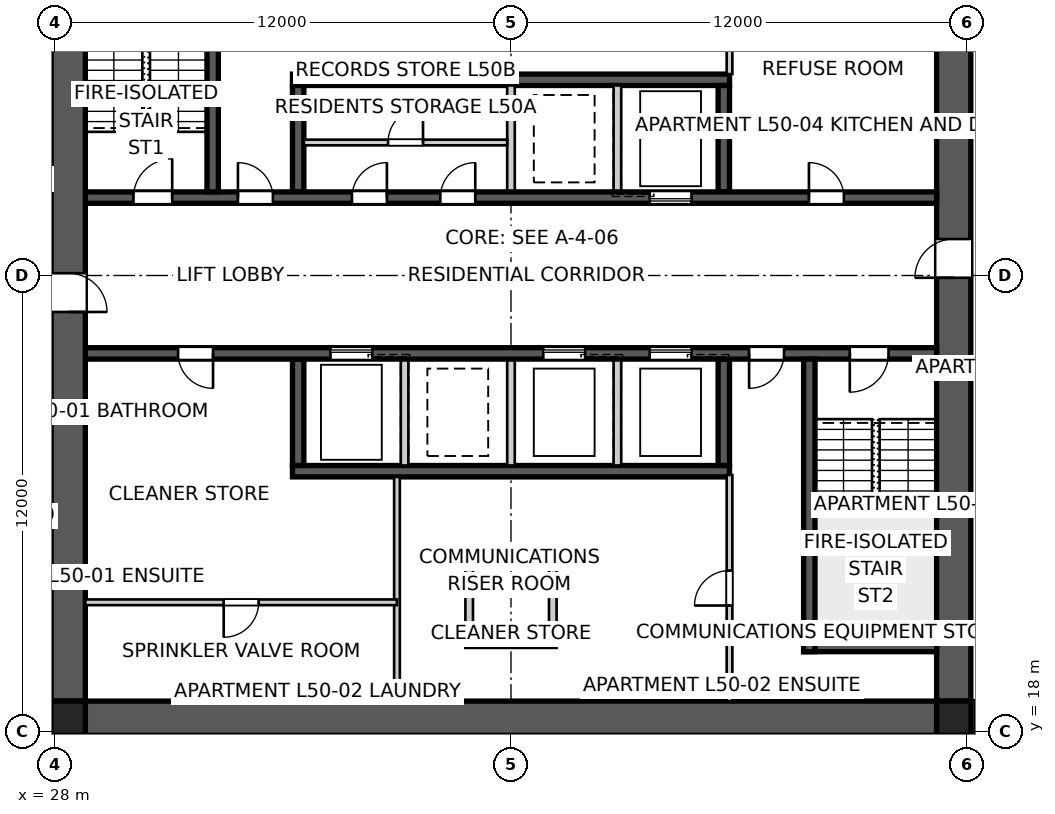
"""IFC4 building model, lengths in metres.
Left out: names, types, materials, properties, quantities, classifications, styles, units other than length and angle.
Written with IfcOpenShell. Run it as: python <this file> out.ifc"""

import sys

from ifc_helpers import new_model, si_unit, direction, frame, frame_2d, origin, origin_2d, place, context, subcontext, project, spatial, polyline, rectangle, outline, extrude, element, fill, save


model = new_model("IFC4")
c1 = context("Model", 3, precision=1e-05, world=origin(), true_north=direction((0.0, 1.0)))
c2 = subcontext(c1, "Body", "Model", "MODEL_VIEW")
j1 = project(units=[si_unit("LENGTHUNIT", "METRE"), si_unit("PLANEANGLEUNIT", "RADIAN")], contexts=[c1])
p1 = place(None, origin())
s1 = spatial("IfcSite", under=j1, at=p1, CompositionType="ELEMENT")
p2 = place(p1, origin())
s2 = spatial("IfcBuilding", under=s1, at=p2, CompositionType="ELEMENT")
p3 = place(p2, frame((0.0, 0.0, 182.8)))
s3 = spatial("IfcBuildingStorey", under=s2, at=p3, CompositionType="ELEMENT", Elevation=182.8)
p4 = place(p3, frame((51.2, 18.35, 0.0), z_axis=(0.0, 0.0, 1.0), x_axis=(-1.0, 0.0, 0.0)))
e1 = element("IfcWall", 1, at=p4, inside=s3, PredefinedType="SHEAR", context=c2, shape_type="SweptSolid", body=[
    extrude(outline(polyline([(0.0, -0.45), (22.4, -0.45), (22.4, -0.025), (22.85, -0.025), (22.85, 0.025), (22.4, 0.025), (22.4, 0.45), (0.0, 0.45), (0.0, 0.025), (-0.45, 0.025), (-0.45, -0.025), (0.0, -0.025), (0.0, -0.45)])), origin(), (0.0, 0.0, 1.0), 3.4),
])
p5 = place(p3, frame((51.65, 18.8, 0.0), z_axis=(0.0, 0.0, 1.0), x_axis=(0.0, 1.0, 0.0)))
e2 = element("IfcWall", 2, at=p5, inside=s3, PredefinedType="SHEAR", context=c2, shape_type="SweptSolid", body=[
    extrude(outline(polyline([(0.0, -0.45), (22.4, -0.45), (22.4, -0.025), (22.85, -0.025), (22.85, 0.025), (22.4, 0.025), (22.4, 0.45), (0.0, 0.45), (0.0, 0.025), (-0.45, 0.025), (-0.45, -0.025), (0.0, -0.025), (0.0, -0.45)])), origin(), (0.0, 0.0, 1.0), 3.4),
])
p6 = place(p5, frame((11.14, 0.0, 0.0)))
e3 = element("IfcOpeningElement", 3, at=p6, cuts=e2, PredefinedType="OPENING", context=c2, shape_type="SweptSolid", body=[
    extrude(rectangle(XDim=1.02, YDim=2.4, at=frame_2d((0.51, 1.2))), frame((0.0, 0.46, 0.0), z_axis=(0.0, -1.0, 0.0), x_axis=(1.0, 0.0, 0.0)), (0.0, 0.0, 1.0), 0.92),
])
p7 = place(p3, frame((28.35, 41.2, 0.0), z_axis=(0.0, 0.0, 1.0), x_axis=(0.0, -1.0, 0.0)))
e4 = element("IfcWall", 4, at=p7, inside=s3, PredefinedType="SHEAR", context=c2, shape_type="SweptSolid", body=[
    extrude(outline(polyline([(0.0, -0.45), (22.4, -0.45), (22.4, -0.025), (22.85, -0.025), (22.85, 0.025), (22.4, 0.025), (22.4, 0.45), (0.0, 0.45), (0.0, 0.025), (-0.45, 0.025), (-0.45, -0.025), (0.0, -0.025), (0.0, -0.45)])), origin(), (0.0, 0.0, 1.0), 3.4),
])
p8 = place(p7, frame((11.14, 0.0, 0.0)))
e5 = element("IfcOpeningElement", 5, at=p8, cuts=e4, PredefinedType="OPENING", context=c2, shape_type="SweptSolid", body=[
    extrude(rectangle(XDim=1.02, YDim=2.4, at=frame_2d((0.51, 1.2))), frame((0.0, 0.46, 0.0), z_axis=(0.0, -1.0, 0.0), x_axis=(1.0, 0.0, 0.0)), (0.0, 0.0, 1.0), 0.92),
])
p9 = place(p3, frame((28.8, 32.05, 0.0), z_axis=(0.0, 0.0, 1.0), x_axis=(1.0, 0.0, 0.0)))
e6 = element("IfcWall", 6, at=p9, inside=s3, PredefinedType="SHEAR", context=c2, shape_type="SweptSolid", body=[
    extrude(rectangle(XDim=22.4, YDim=0.3, at=frame_2d((11.2, 0.0))), origin(), (0.0, 0.0, 1.0), 3.4),
])
p10 = place(p9, frame((19.04, 0.0, 0.0)))
e7 = element("IfcOpeningElement", 7, at=p10, cuts=e6, PredefinedType="OPENING", context=c2, shape_type="SweptSolid", body=[
    extrude(rectangle(XDim=0.92, YDim=2.1, at=frame_2d((0.46, 1.05))), frame((0.0, 0.16, 0.0), z_axis=(0.0, -1.0, 0.0), x_axis=(1.0, 0.0, 0.0)), (0.0, 0.0, 1.0), 0.32),
])
p11 = place(p9, frame((1.265, 0.0, 0.0)))
e8 = element("IfcOpeningElement", 8, at=p11, cuts=e6, PredefinedType="OPENING", context=c2, shape_type="SweptSolid", body=[
    extrude(rectangle(XDim=1.02, YDim=2.1, at=frame_2d((0.51, 1.05))), frame((0.0, 0.16, 0.0), z_axis=(0.0, -1.0, 0.0), x_axis=(1.0, 0.0, 0.0)), (0.0, 0.0, 1.0), 0.32),
])
p12 = place(p9, frame((4.015, 0.0, 0.0)))
e9 = element("IfcOpeningElement", 9, at=p12, cuts=e6, PredefinedType="OPENING", context=c2, shape_type="SweptSolid", body=[
    extrude(rectangle(XDim=0.92, YDim=2.1, at=frame_2d((0.46, 1.05))), frame((0.0, 0.16, 0.0), z_axis=(0.0, -1.0, 0.0), x_axis=(1.0, 0.0, 0.0)), (0.0, 0.0, 1.0), 0.32),
])
p13 = place(p9, frame((7.015, 0.0, 0.0)))
e10 = element("IfcOpeningElement", 10, at=p13, cuts=e6, PredefinedType="OPENING", context=c2, shape_type="SweptSolid", body=[
    extrude(rectangle(XDim=0.92, YDim=2.1, at=frame_2d((0.46, 1.05))), frame((0.0, 0.16, 0.0), z_axis=(0.0, -1.0, 0.0), x_axis=(1.0, 0.0, 0.0)), (0.0, 0.0, 1.0), 0.32),
])
p14 = place(p9, frame((9.34, 0.0, 0.0)))
e11 = element("IfcOpeningElement", 11, at=p14, cuts=e6, PredefinedType="OPENING", context=c2, shape_type="SweptSolid", body=[
    extrude(rectangle(XDim=0.92, YDim=2.1, at=frame_2d((0.46, 1.05))), frame((0.0, 0.16, 0.0), z_axis=(0.0, -1.0, 0.0), x_axis=(1.0, 0.0, 0.0)), (0.0, 0.0, 1.0), 0.32),
])
p15 = place(p9, frame((14.85, 0.0, 0.0)))
e12 = element("IfcOpeningElement", 12, at=p15, cuts=e6, PredefinedType="OPENING", context=c2, shape_type="SweptSolid", body=[
    extrude(rectangle(XDim=1.1, YDim=2.1, at=frame_2d((0.55, 1.05))), frame((0.0, 0.16, 0.0), z_axis=(0.0, -1.0, 0.0), x_axis=(1.0, 0.0, 0.0)), (0.0, 0.0, 1.0), 0.32),
])
p16 = place(p3, frame((51.2, 27.95, 0.0), z_axis=(0.0, 0.0, 1.0), x_axis=(-1.0, 0.0, 0.0)))
e13 = element("IfcWall", 13, at=p16, inside=s3, PredefinedType="SHEAR", context=c2, shape_type="SweptSolid", body=[
    extrude(rectangle(XDim=22.4, YDim=0.3, at=frame_2d((11.2, 0.0))), origin(), (0.0, 0.0, 1.0), 3.4),
])
p17 = place(p16, frame((19.04, 0.0, 0.0)))
e14 = element("IfcOpeningElement", 14, at=p17, cuts=e13, PredefinedType="OPENING", context=c2, shape_type="SweptSolid", body=[
    extrude(rectangle(XDim=0.92, YDim=2.1, at=frame_2d((0.46, 1.05))), frame((0.0, 0.16, 0.0), z_axis=(0.0, -1.0, 0.0), x_axis=(1.0, 0.0, 0.0)), (0.0, 0.0, 1.0), 0.32),
])
p18 = place(p16, frame((1.265, 0.0, 0.0)))
e15 = element("IfcOpeningElement", 15, at=p18, cuts=e13, PredefinedType="OPENING", context=c2, shape_type="SweptSolid", body=[
    extrude(rectangle(XDim=1.02, YDim=2.1, at=frame_2d((0.51, 1.05))), frame((0.0, 0.16, 0.0), z_axis=(0.0, -1.0, 0.0), x_axis=(1.0, 0.0, 0.0)), (0.0, 0.0, 1.0), 0.32),
])
p19 = place(p16, frame((4.015, 0.0, 0.0)))
e16 = element("IfcOpeningElement", 16, at=p19, cuts=e13, PredefinedType="OPENING", context=c2, shape_type="SweptSolid", body=[
    extrude(rectangle(XDim=0.92, YDim=2.1, at=frame_2d((0.46, 1.05))), frame((0.0, 0.16, 0.0), z_axis=(0.0, -1.0, 0.0), x_axis=(1.0, 0.0, 0.0)), (0.0, 0.0, 1.0), 0.32),
])
p20 = place(p16, frame((6.45, 0.0, 0.0)))
e17 = element("IfcOpeningElement", 17, at=p20, cuts=e13, PredefinedType="OPENING", context=c2, shape_type="SweptSolid", body=[
    extrude(rectangle(XDim=1.1, YDim=2.1, at=frame_2d((0.55, 1.05))), frame((0.0, 0.16, 0.0), z_axis=(0.0, -1.0, 0.0), x_axis=(1.0, 0.0, 0.0)), (0.0, 0.0, 1.0), 0.32),
])
p21 = place(p16, frame((9.25, 0.0, 0.0)))
e18 = element("IfcOpeningElement", 18, at=p21, cuts=e13, PredefinedType="OPENING", context=c2, shape_type="SweptSolid", body=[
    extrude(rectangle(XDim=1.1, YDim=2.1, at=frame_2d((0.55, 1.05))), frame((0.0, 0.16, 0.0), z_axis=(0.0, -1.0, 0.0), x_axis=(1.0, 0.0, 0.0)), (0.0, 0.0, 1.0), 0.32),
])
p22 = place(p16, frame((14.85, 0.0, 0.0)))
e19 = element("IfcOpeningElement", 19, at=p22, cuts=e13, PredefinedType="OPENING", context=c2, shape_type="SweptSolid", body=[
    extrude(rectangle(XDim=1.1, YDim=2.1, at=frame_2d((0.55, 1.05))), frame((0.0, 0.16, 0.0), z_axis=(0.0, -1.0, 0.0), x_axis=(1.0, 0.0, 0.0)), (0.0, 0.0, 1.0), 0.32),
])
for number, where, z_axis, x_axis in (
    (20, (34.25, 35.15, 0.0), (0.0, 0.0, 1.0), (1.0, 0.0, 0.0)),
    (21, (45.75, 24.85, 0.0), (0.0, 0.0, 1.0), (-1.0, 0.0, 0.0)),
):
    element("IfcWall", number, at=place(p3, frame(where, z_axis=z_axis, x_axis=x_axis)), inside=s3, PredefinedType="SHEAR", context=c2, shape_type="SweptSolid", body=[
        extrude(rectangle(XDim=11.5, YDim=0.3, at=frame_2d((5.75, 0.0))), origin(), (0.0, 0.0, 1.0), 3.4),
    ])
for number, where, z_axis, x_axis in (
    (22, (34.4, 32.2, 0.0), (0.0, 0.0, 1.0), (0.0, 1.0, 0.0)),
    (23, (45.6, 27.8, 0.0), (0.0, 0.0, 1.0), (0.0, -1.0, 0.0)),
):
    element("IfcWall", number, at=place(p3, frame(where, z_axis=z_axis, x_axis=x_axis)), inside=s3, PredefinedType="SHEAR", context=c2, shape_type="SweptSolid", body=[
        extrude(rectangle(XDim=2.8, YDim=0.3, at=frame_2d((1.4, 0.0))), origin(), (0.0, 0.0, 1.0), 3.4),
    ])
for number, where, z_axis, x_axis in (
    (24, (42.8, 27.8, 0.0), (0.0, 0.0, 1.0), (0.0, -1.0, 0.0)),
    (25, (40.0, 32.2, 0.0), (0.0, 0.0, 1.0), (0.0, 1.0, 0.0)),
    (26, (40.0, 27.8, 0.0), (0.0, 0.0, 1.0), (0.0, -1.0, 0.0)),
    (27, (42.8, 32.2, 0.0), (0.0, 0.0, 1.0), (0.0, 1.0, 0.0)),
    (28, (37.2, 27.8, 0.0), (0.0, 0.0, 1.0), (0.0, -1.0, 0.0)),
):
    element("IfcWall", number, at=place(p3, frame(where, z_axis=z_axis, x_axis=x_axis)), inside=s3, PredefinedType="SOLIDWALL", context=c2, shape_type="SweptSolid", body=[
        extrude(rectangle(XDim=2.8, YDim=0.2, at=frame_2d((1.4, 0.0))), origin(), (0.0, 0.0, 1.0), 3.4),
    ])
for number, where, z_axis, x_axis in (
    (29, (45.6, 32.2, 0.0), (0.0, 0.0, 1.0), (0.0, 1.0, 0.0)),
    (30, (34.4, 27.8, 0.0), (0.0, 0.0, 1.0), (0.0, -1.0, 0.0)),
):
    element("IfcWall", number, at=place(p3, frame(where, z_axis=z_axis, x_axis=x_axis)), inside=s3, PredefinedType="SHEAR", context=c2, shape_type="SweptSolid", body=[
        extrude(rectangle(XDim=2.8, YDim=0.3, at=frame_2d((1.4, 0.0))), origin(), (0.0, 0.0, 1.0), 3.4),
    ])
for number, where, z_axis, x_axis in (
    (31, (32.15, 32.2, 0.0), (0.0, 0.0, 1.0), (0.0, 1.0, 0.0)),
    (32, (47.85, 27.8, 0.0), (0.0, 0.0, 1.0), (0.0, -1.0, 0.0)),
):
    element("IfcWall", number, at=place(p3, frame(where, z_axis=z_axis, x_axis=x_axis)), inside=s3, PredefinedType="SHEAR", context=c2, shape_type="SweptSolid", body=[
        extrude(rectangle(XDim=7.7, YDim=0.3, at=frame_2d((3.85, 0.0))), origin(), (0.0, 0.0, 1.0), 3.4),
    ])
p23 = place(p3, frame((51.2, 20.25, 0.0), z_axis=(0.0, 0.0, 1.0), x_axis=(-1.0, 0.0, 0.0)))
e33 = element("IfcWall", 33, at=p23, inside=s3, PredefinedType="SHEAR", context=c2, shape_type="SweptSolid", body=[
    extrude(rectangle(XDim=3.5, YDim=0.3, at=frame_2d((1.75, 0.0))), origin(), (0.0, 0.0, 1.0), 3.4),
])
for number, where, z_axis, x_axis in (
    (34, (38.9, 22.4, 0.0), (0.0, 0.0, 1.0), (0.0, -1.0, 0.0)),
    (35, (41.1, 22.4, 0.0), (0.0, 0.0, 1.0), (0.0, -1.0, 0.0)),
):
    element("IfcWall", number, at=place(p3, frame(where, z_axis=z_axis, x_axis=x_axis)), inside=s3, PredefinedType="SOLIDWALL", context=c2, shape_type="SweptSolid", body=[
        extrude(rectangle(XDim=2.0, YDim=0.2, at=frame_2d((1.0, 0.0))), origin(), (0.0, 0.0, 1.0), 3.4),
    ])
for number, where, z_axis, x_axis in (
    (36, (38.8, 22.5, 0.0), (0.0, 0.0, 1.0), (1.0, 0.0, 0.0)),
    (37, (38.8, 20.3, 0.0), (0.0, 0.0, 1.0), (1.0, 0.0, 0.0)),
):
    element("IfcWall", number, at=place(p3, frame(where, z_axis=z_axis, x_axis=x_axis)), inside=s3, PredefinedType="SOLIDWALL", context=c2, shape_type="SweptSolid", body=[
        extrude(rectangle(XDim=2.4, YDim=0.2, at=frame_2d((1.2, 0.0))), origin(), (0.0, 0.0, 1.0), 3.4),
    ])
for number, where, z_axis, x_axis in (
    (38, (28.35, 18.35, 0.0), (0.0, 0.0, 1.0), (1.0, 0.0, 0.0)),
    (39, (51.65, 18.35, 0.0), (0.0, 0.0, 1.0), (1.0, 0.0, 0.0)),
):
    element("IfcColumn", number, at=place(p3, frame(where, z_axis=z_axis, x_axis=x_axis)), inside=s3, PredefinedType="COLUMN", context=c2, shape_type="SweptSolid", body=[
        extrude(rectangle(XDim=0.9, YDim=0.9, at=origin_2d()), origin(), (0.0, 0.0, 1.0), 3.4),
    ])
p24 = place(p3, frame((45.75, 41.2, 0.0), z_axis=(0.0, 0.0, 1.0), x_axis=(0.0, -1.0, 0.0)))
e40 = element("IfcWall", 40, at=p24, inside=s3, PredefinedType="SOLIDWALL", context=c2, shape_type="SweptSolid", body=[
    extrude(rectangle(XDim=5.9, YDim=0.15, at=frame_2d((2.95, 0.0))), origin(), (0.0, 0.0, 1.0), 3.25),
])
p25 = place(p3, frame((45.75, 18.8, 0.0), z_axis=(0.0, 0.0, 1.0), x_axis=(0.0, 1.0, 0.0)))
e41 = element("IfcWall", 41, at=p25, inside=s3, PredefinedType="SOLIDWALL", context=c2, shape_type="SweptSolid", body=[
    extrude(rectangle(XDim=5.95, YDim=0.15, at=frame_2d((2.975, 0.0))), origin(), (0.0, 0.0, 1.0), 3.25),
])
p26 = place(p25, frame((2.515, 0.0, 0.0)))
e42 = element("IfcOpeningElement", 42, at=p26, cuts=e41, PredefinedType="OPENING", context=c2, shape_type="SweptSolid", body=[
    extrude(rectangle(XDim=0.92, YDim=2.1, at=frame_2d((0.46, 1.05))), frame((0.0, 0.085, 0.0), z_axis=(0.0, -1.0, 0.0), x_axis=(1.0, 0.0, 0.0)), (0.0, 0.0, 1.0), 0.17),
])
p27 = place(p3, frame((37.0, 18.8, 0.0), z_axis=(0.0, 0.0, 1.0), x_axis=(0.0, 1.0, 0.0)))
e43 = element("IfcWall", 43, at=p27, inside=s3, PredefinedType="SOLIDWALL", context=c2, shape_type="SweptSolid", body=[
    extrude(rectangle(XDim=5.9, YDim=0.15, at=frame_2d((2.95, 0.0))), origin(), (0.0, 0.0, 1.0), 3.25),
])
p28 = place(p3, frame((37.0, 21.4, 0.0), z_axis=(0.0, 0.0, 1.0), x_axis=(-1.0, 0.0, 0.0)))
e44 = element("IfcWall", 44, at=p28, inside=s3, PredefinedType="SOLIDWALL", context=c2, shape_type="SweptSolid", body=[
    extrude(rectangle(XDim=8.2, YDim=0.15, at=frame_2d((4.1, 0.0))), origin(), (0.0, 0.0, 1.0), 3.25),
])
p29 = place(p28, frame((3.64, 0.0, 0.0)))
e45 = element("IfcOpeningElement", 45, at=p29, cuts=e44, PredefinedType="OPENING", context=c2, shape_type="SweptSolid", body=[
    extrude(rectangle(XDim=0.92, YDim=2.1, at=frame_2d((0.46, 1.05))), frame((0.0, 0.085, 0.0), z_axis=(0.0, -1.0, 0.0), x_axis=(1.0, 0.0, 0.0)), (0.0, 0.0, 1.0), 0.17),
])
p30 = place(p3, frame((27.9, 17.95, 0.0), z_axis=(0.0, 0.0, 1.0), x_axis=(0.0, -1.0, 0.0)))
e46 = element("IfcWall", 46, at=p30, inside=s3, PredefinedType="PARTITIONING", context=c2, shape_type="SweptSolid", body=[
    extrude(rectangle(XDim=2.3, YDim=0.2, at=frame_2d((1.15, 0.0))), origin(), (0.0, 0.0, 1.0), 3.25),
])
p31 = place(p3, frame((52.1, 15.65, 0.0), z_axis=(0.0, 0.0, 1.0), x_axis=(0.0, 1.0, 0.0)))
e47 = element("IfcWall", 47, at=p31, inside=s3, PredefinedType="PARTITIONING", context=c2, shape_type="SweptSolid", body=[
    extrude(rectangle(XDim=3.17, YDim=0.2, at=frame_2d((1.585, 0.0))), origin(), (0.0, 0.0, 1.0), 3.25),
])
p32 = place(p3, frame((34.55, 33.5, 0.0), z_axis=(0.0, 0.0, 1.0), x_axis=(1.0, 0.0, 0.0)))
e48 = element("IfcWall", 48, at=p32, inside=s3, PredefinedType="SOLIDWALL", context=c2, shape_type="SweptSolid", body=[
    extrude(rectangle(XDim=5.35, YDim=0.15, at=frame_2d((2.675, 0.0))), origin(), (0.0, 0.0, 1.0), 3.25),
])
p33 = place(p32, frame((2.215, 0.0, 0.0)))
e49 = element("IfcOpeningElement", 49, at=p33, cuts=e48, PredefinedType="OPENING", context=c2, shape_type="SweptSolid", body=[
    extrude(rectangle(XDim=0.92, YDim=2.1, at=frame_2d((0.46, 1.05))), frame((0.0, 0.085, 0.0), z_axis=(0.0, -1.0, 0.0), x_axis=(1.0, 0.0, 0.0)), (0.0, 0.0, 1.0), 0.17),
])
p34 = place(p10, origin())
e50 = element("IfcDoor", 50, at=p34, inside=s3, OperationType="SINGLE_SWING_LEFT", PredefinedType="DOOR", context=c2, shape_type="SweptSolid", body=[
    extrude(rectangle(XDim=0.92, YDim=2.1, at=frame_2d((0.46, 1.05))), frame((0.0, 0.025, 0.0), z_axis=(0.0, -1.0, 0.0), x_axis=(1.0, 0.0, 0.0)), (0.0, 0.0, 1.0), 0.05),
])
fill(e7, e50)
p35 = place(p17, origin())
e51 = element("IfcDoor", 51, at=p35, inside=s3, OperationType="SINGLE_SWING_LEFT", PredefinedType="DOOR", context=c2, shape_type="SweptSolid", body=[
    extrude(rectangle(XDim=0.92, YDim=2.1, at=frame_2d((0.46, 1.05))), frame((0.0, 0.025, 0.0), z_axis=(0.0, -1.0, 0.0), x_axis=(1.0, 0.0, 0.0)), (0.0, 0.0, 1.0), 0.05),
])
fill(e14, e51)
p36 = place(p18, origin())
e52 = element("IfcDoor", 52, at=p36, inside=s3, OperationType="SINGLE_SWING_RIGHT", PredefinedType="DOOR", context=c2, shape_type="SweptSolid", body=[
    extrude(rectangle(XDim=1.02, YDim=2.1, at=frame_2d((0.51, 1.05))), frame((0.0, 0.025, 0.0), z_axis=(0.0, -1.0, 0.0), x_axis=(1.0, 0.0, 0.0)), (0.0, 0.0, 1.0), 0.05),
])
fill(e15, e52)
p37 = place(p11, origin())
e53 = element("IfcDoor", 53, at=p37, inside=s3, OperationType="SINGLE_SWING_RIGHT", PredefinedType="DOOR", context=c2, shape_type="SweptSolid", body=[
    extrude(rectangle(XDim=1.02, YDim=2.1, at=frame_2d((0.51, 1.05))), frame((0.0, 0.025, 0.0), z_axis=(0.0, -1.0, 0.0), x_axis=(1.0, 0.0, 0.0)), (0.0, 0.0, 1.0), 0.05),
])
fill(e8, e53)
p38 = place(p12, origin())
e54 = element("IfcDoor", 54, at=p38, inside=s3, OperationType="SINGLE_SWING_LEFT", PredefinedType="DOOR", context=c2, shape_type="SweptSolid", body=[
    extrude(rectangle(XDim=0.92, YDim=2.1, at=frame_2d((0.46, 1.05))), frame((0.0, 0.025, 0.0), z_axis=(0.0, -1.0, 0.0), x_axis=(1.0, 0.0, 0.0)), (0.0, 0.0, 1.0), 0.05),
])
fill(e9, e54)
p39 = place(p19, origin())
e55 = element("IfcDoor", 55, at=p39, inside=s3, OperationType="SINGLE_SWING_RIGHT", PredefinedType="DOOR", context=c2, shape_type="SweptSolid", body=[
    extrude(rectangle(XDim=0.92, YDim=2.1, at=frame_2d((0.46, 1.05))), frame((0.0, 0.025, 0.0), z_axis=(0.0, -1.0, 0.0), x_axis=(1.0, 0.0, 0.0)), (0.0, 0.0, 1.0), 0.05),
])
fill(e16, e55)
p40 = place(p29, origin())
e56 = element("IfcDoor", 56, at=p40, inside=s3, OperationType="SINGLE_SWING_RIGHT", PredefinedType="DOOR", context=c2, shape_type="SweptSolid", body=[
    extrude(rectangle(XDim=0.92, YDim=2.1, at=frame_2d((0.46, 1.05))), frame((0.0, 0.025, 0.0), z_axis=(0.0, -1.0, 0.0), x_axis=(1.0, 0.0, 0.0)), (0.0, 0.0, 1.0), 0.05),
])
fill(e45, e56)
p41 = place(p26, origin())
e57 = element("IfcDoor", 57, at=p41, inside=s3, OperationType="SINGLE_SWING_LEFT", PredefinedType="DOOR", context=c2, shape_type="SweptSolid", body=[
    extrude(rectangle(XDim=0.92, YDim=2.1, at=frame_2d((0.46, 1.05))), frame((0.0, 0.025, 0.0), z_axis=(0.0, -1.0, 0.0), x_axis=(1.0, 0.0, 0.0)), (0.0, 0.0, 1.0), 0.05),
])
fill(e42, e57)
p42 = place(p13, origin())
e58 = element("IfcDoor", 58, at=p42, inside=s3, OperationType="SINGLE_SWING_RIGHT", PredefinedType="DOOR", context=c2, shape_type="SweptSolid", body=[
    extrude(rectangle(XDim=0.92, YDim=2.1, at=frame_2d((0.46, 1.05))), frame((0.0, 0.025, 0.0), z_axis=(0.0, -1.0, 0.0), x_axis=(1.0, 0.0, 0.0)), (0.0, 0.0, 1.0), 0.05),
])
fill(e10, e58)
p43 = place(p14, origin())
e59 = element("IfcDoor", 59, at=p43, inside=s3, OperationType="SINGLE_SWING_RIGHT", PredefinedType="DOOR", context=c2, shape_type="SweptSolid", body=[
    extrude(rectangle(XDim=0.92, YDim=2.1, at=frame_2d((0.46, 1.05))), frame((0.0, 0.025, 0.0), z_axis=(0.0, -1.0, 0.0), x_axis=(1.0, 0.0, 0.0)), (0.0, 0.0, 1.0), 0.05),
])
fill(e11, e59)
p44 = place(p33, origin())
e60 = element("IfcDoor", 60, at=p44, inside=s3, OperationType="SINGLE_SWING_RIGHT", PredefinedType="DOOR", context=c2, shape_type="SweptSolid", body=[
    extrude(rectangle(XDim=0.92, YDim=2.1, at=frame_2d((0.46, 1.05))), frame((0.0, 0.025, 0.0), z_axis=(0.0, -1.0, 0.0), x_axis=(1.0, 0.0, 0.0)), (0.0, 0.0, 1.0), 0.05),
])
fill(e49, e60)
p45 = place(p6, origin())
e61 = element("IfcDoor", 61, at=p45, inside=s3, OperationType="SINGLE_SWING_LEFT", PredefinedType="DOOR", context=c2, shape_type="SweptSolid", body=[
    extrude(rectangle(XDim=1.02, YDim=2.4, at=frame_2d((0.51, 1.2))), frame((0.0, 0.025, 0.0), z_axis=(0.0, -1.0, 0.0), x_axis=(1.0, 0.0, 0.0)), (0.0, 0.0, 1.0), 0.05),
])
fill(e3, e61)
p46 = place(p8, origin())
e62 = element("IfcDoor", 62, at=p46, inside=s3, OperationType="SINGLE_SWING_RIGHT", PredefinedType="DOOR", context=c2, shape_type="SweptSolid", body=[
    extrude(rectangle(XDim=1.02, YDim=2.4, at=frame_2d((0.51, 1.2))), frame((0.0, 0.025, 0.0), z_axis=(0.0, -1.0, 0.0), x_axis=(1.0, 0.0, 0.0)), (0.0, 0.0, 1.0), 0.05),
])
fill(e5, e62)
p47 = place(p20, origin())
e63 = element("IfcDoor", 63, at=p47, inside=s3, OperationType="SLIDING_TO_LEFT", PredefinedType="DOOR", context=c2, shape_type="SweptSolid", body=[
    extrude(rectangle(XDim=1.1, YDim=2.1, at=frame_2d((0.55, 1.05))), frame((0.0, 0.025, 0.0), z_axis=(0.0, -1.0, 0.0), x_axis=(1.0, 0.0, 0.0)), (0.0, 0.0, 1.0), 0.05),
])
fill(e17, e63)
p48 = place(p21, origin())
e64 = element("IfcDoor", 64, at=p48, inside=s3, OperationType="SLIDING_TO_LEFT", PredefinedType="DOOR", context=c2, shape_type="SweptSolid", body=[
    extrude(rectangle(XDim=1.1, YDim=2.1, at=frame_2d((0.55, 1.05))), frame((0.0, 0.025, 0.0), z_axis=(0.0, -1.0, 0.0), x_axis=(1.0, 0.0, 0.0)), (0.0, 0.0, 1.0), 0.05),
])
fill(e18, e64)
p49 = place(p15, origin())
e65 = element("IfcDoor", 65, at=p49, inside=s3, OperationType="SLIDING_TO_LEFT", PredefinedType="DOOR", context=c2, shape_type="SweptSolid", body=[
    extrude(rectangle(XDim=1.1, YDim=2.1, at=frame_2d((0.55, 1.05))), frame((0.0, 0.025, 0.0), z_axis=(0.0, -1.0, 0.0), x_axis=(1.0, 0.0, 0.0)), (0.0, 0.0, 1.0), 0.05),
])
fill(e12, e65)
p50 = place(p22, origin())
e66 = element("IfcDoor", 66, at=p50, inside=s3, OperationType="SLIDING_TO_LEFT", PredefinedType="DOOR", context=c2, shape_type="SweptSolid", body=[
    extrude(rectangle(XDim=1.1, YDim=2.1, at=frame_2d((0.55, 1.05))), frame((0.0, 0.025, 0.0), z_axis=(0.0, -1.0, 0.0), x_axis=(1.0, 0.0, 0.0)), (0.0, 0.0, 1.0), 0.05),
])
fill(e19, e66)
save(model, sys.argv[1])
